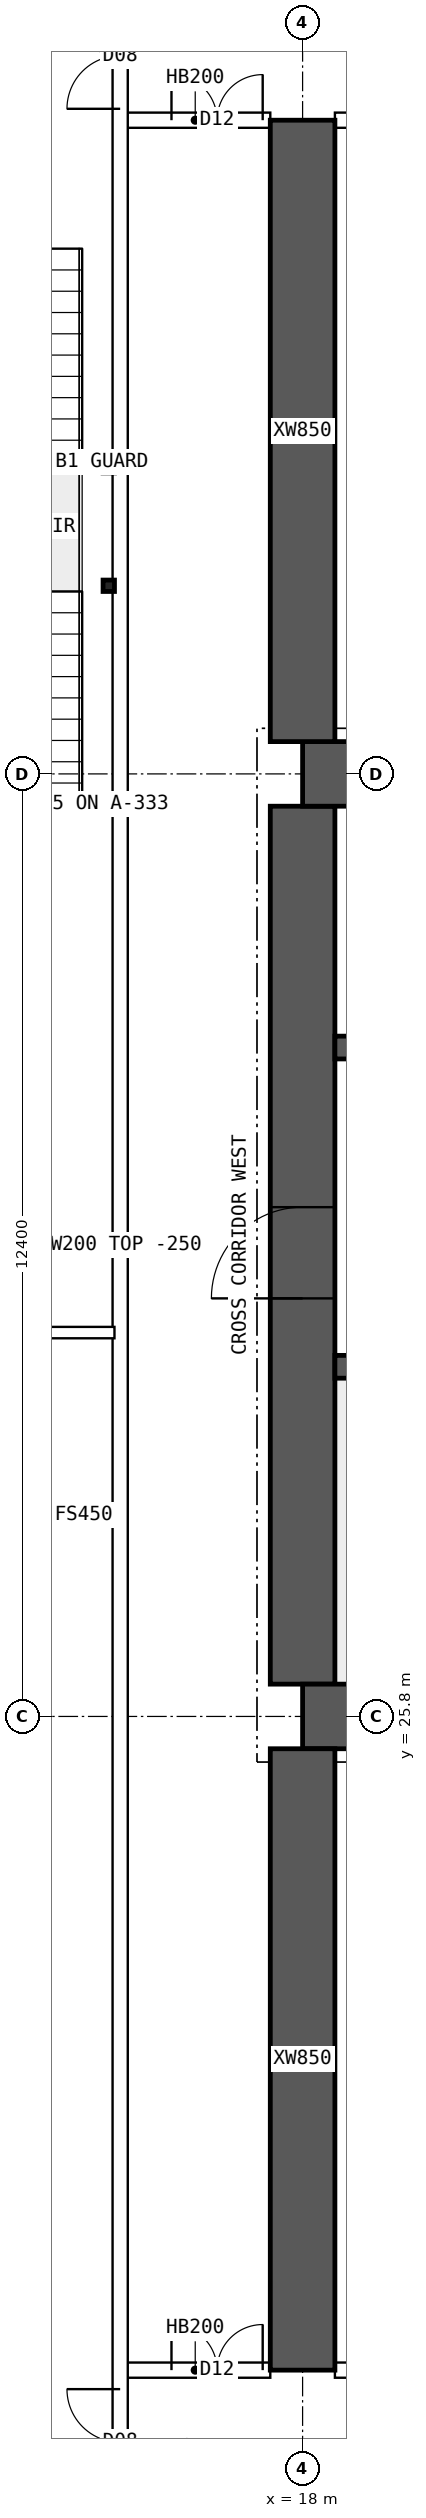
"""IFC4 building model, lengths in metres.
Left out: names, types, materials, properties, quantities, classifications, styles, units other than length and angle.
Written with IfcOpenShell. Run it as: python <this file> out.ifc"""

import sys

from ifc_helpers import new_model, si_unit, direction, frame, frame_2d, origin, origin_2d, place, context, subcontext, project, spatial, polyline, rectangle, hollow_rectangle, outline, extrude, element, fill, save


model = new_model("IFC4")
c1 = context("Model", 3, precision=1e-05, world=origin(), true_north=direction((0.0, 1.0)))
c2 = subcontext(c1, "Body", "Model", "MODEL_VIEW")
j1 = project(units=[si_unit("LENGTHUNIT", "METRE"), si_unit("PLANEANGLEUNIT", "RADIAN")], contexts=[c1])
p1 = place(None, origin())
s1 = spatial("IfcSite", under=j1, at=p1, CompositionType="ELEMENT")
p2 = place(p1, origin())
s2 = spatial("IfcBuilding", under=s1, at=p2, CompositionType="ELEMENT")
p3 = place(p2, frame((0.0, 0.0, 148.6)))
s3 = spatial("IfcBuildingStorey", under=s2, at=p3, CompositionType="ELEMENT", Elevation=148.6)
for number, where, z_axis, x_axis in (
    (1, (18.0, 25.8, 0.0), (0.0, 0.0, 1.0), (1.0, 0.0, 0.0)),
    (2, (18.0, 38.2, 0.0), (0.0, 0.0, 1.0), (1.0, 0.0, 0.0)),
):
    element("IfcWall", number, at=place(p3, frame(where, z_axis=z_axis, x_axis=x_axis)), inside=s3, PredefinedType="SHEAR", context=c2, shape_type="SweptSolid", body=[
        extrude(rectangle(XDim=48.0, YDim=0.85, at=frame_2d((24.0, 0.0))), origin(), (0.0, 0.0, 1.0), 3.75),
    ])
p4 = place(p3, frame((18.0, 26.225, 0.0), z_axis=(0.0, 0.0, 1.0), x_axis=(0.0, 1.0, 0.0)))
e3 = element("IfcWall", 3, at=p4, inside=s3, PredefinedType="SHEAR", context=c2, shape_type="SweptSolid", body=[
    extrude(rectangle(XDim=11.55, YDim=0.85, at=frame_2d((5.775, 0.0))), origin(), (0.0, 0.0, 1.0), 3.75),
])
p5 = place(p4, frame((5.075, 0.0, 0.0)))
e4 = element("IfcOpeningElement", 4, at=p5, cuts=e3, PredefinedType="OPENING", context=c2, shape_type="SweptSolid", body=[
    extrude(rectangle(XDim=1.2, YDim=2.1, at=frame_2d((0.6, 1.05))), frame((0.0, 0.435, 0.0), z_axis=(0.0, -1.0, 0.0), x_axis=(1.0, 0.0, 0.0)), (0.0, 0.0, 1.0), 0.87),
])
p6 = place(p3, frame((18.425, 30.4, 0.0), z_axis=(0.0, 0.0, 1.0), x_axis=(1.0, 0.0, 0.0)))
e5 = element("IfcWall", 5, at=p6, inside=s3, PredefinedType="SHEAR", context=c2, shape_type="SweptSolid", body=[
    extrude(rectangle(XDim=47.15, YDim=0.3, at=frame_2d((23.575, 0.0))), origin(), (0.0, 0.0, 1.0), 3.75),
])
p7 = place(p6, frame((0.4, 0.0, 0.0)))
e6 = element("IfcOpeningElement", 6, at=p7, cuts=e5, PredefinedType="OPENING", context=c2, shape_type="SweptSolid", body=[
    extrude(rectangle(XDim=1.0, YDim=2.1, at=frame_2d((0.5, 1.05))), frame((0.0, 0.16, 0.0), z_axis=(0.0, -1.0, 0.0), x_axis=(1.0, 0.0, 0.0)), (0.0, 0.0, 1.0), 0.32),
])
p8 = place(p6, frame((45.75, 0.0, 0.0)))
e7 = element("IfcOpeningElement", 7, at=p8, cuts=e5, PredefinedType="OPENING", context=c2, shape_type="SweptSolid", body=[
    extrude(rectangle(XDim=1.0, YDim=2.1, at=frame_2d((0.5, 1.05))), frame((0.0, 0.16, 0.0), z_axis=(0.0, -1.0, 0.0), x_axis=(1.0, 0.0, 0.0)), (0.0, 0.0, 1.0), 0.32),
])
p9 = place(p6, frame((8.325, 0.0, 0.0)))
e8 = element("IfcOpeningElement", 8, at=p9, cuts=e5, PredefinedType="OPENING", context=c2, shape_type="SweptSolid", body=[
    extrude(rectangle(XDim=1.1, YDim=2.1, at=frame_2d((0.55, 1.05))), frame((0.0, 0.16, 0.0), z_axis=(0.0, -1.0, 0.0), x_axis=(1.0, 0.0, 0.0)), (0.0, 0.0, 1.0), 0.32),
])
p10 = place(p6, frame((10.925, 0.0, 0.0)))
e9 = element("IfcOpeningElement", 9, at=p10, cuts=e5, PredefinedType="OPENING", context=c2, shape_type="SweptSolid", body=[
    extrude(rectangle(XDim=1.1, YDim=2.1, at=frame_2d((0.55, 1.05))), frame((0.0, 0.16, 0.0), z_axis=(0.0, -1.0, 0.0), x_axis=(1.0, 0.0, 0.0)), (0.0, 0.0, 1.0), 0.32),
])
p11 = place(p6, frame((13.525, 0.0, 0.0)))
e10 = element("IfcOpeningElement", 10, at=p11, cuts=e5, PredefinedType="OPENING", context=c2, shape_type="SweptSolid", body=[
    extrude(rectangle(XDim=1.1, YDim=2.1, at=frame_2d((0.55, 1.05))), frame((0.0, 0.16, 0.0), z_axis=(0.0, -1.0, 0.0), x_axis=(1.0, 0.0, 0.0)), (0.0, 0.0, 1.0), 0.32),
])
p12 = place(p6, frame((16.125, 0.0, 0.0)))
e11 = element("IfcOpeningElement", 11, at=p12, cuts=e5, PredefinedType="OPENING", context=c2, shape_type="SweptSolid", body=[
    extrude(rectangle(XDim=1.1, YDim=2.1, at=frame_2d((0.55, 1.05))), frame((0.0, 0.16, 0.0), z_axis=(0.0, -1.0, 0.0), x_axis=(1.0, 0.0, 0.0)), (0.0, 0.0, 1.0), 0.32),
])
p13 = place(p6, frame((18.9, 0.0, 0.0)))
e12 = element("IfcOpeningElement", 12, at=p13, cuts=e5, PredefinedType="OPENING", context=c2, shape_type="SweptSolid", body=[
    extrude(rectangle(XDim=0.9, YDim=2.1, at=frame_2d((0.45, 1.05))), frame((0.0, 0.16, 0.0), z_axis=(0.0, -1.0, 0.0), x_axis=(1.0, 0.0, 0.0)), (0.0, 0.0, 1.0), 0.32),
])
p14 = place(p6, frame((30.192, 0.0, 0.0)))
e13 = element("IfcOpeningElement", 13, at=p14, cuts=e5, PredefinedType="OPENING", context=c2, shape_type="SweptSolid", body=[
    extrude(rectangle(XDim=1.1, YDim=2.1, at=frame_2d((0.55, 1.05))), frame((0.0, 0.16, 0.0), z_axis=(0.0, -1.0, 0.0), x_axis=(1.0, 0.0, 0.0)), (0.0, 0.0, 1.0), 0.32),
])
p15 = place(p6, frame((33.725, 0.0, 0.0)))
e14 = element("IfcOpeningElement", 14, at=p15, cuts=e5, PredefinedType="OPENING", context=c2, shape_type="SweptSolid", body=[
    extrude(rectangle(XDim=1.1, YDim=2.1, at=frame_2d((0.55, 1.05))), frame((0.0, 0.16, 0.0), z_axis=(0.0, -1.0, 0.0), x_axis=(1.0, 0.0, 0.0)), (0.0, 0.0, 1.0), 0.32),
])
p16 = place(p6, frame((37.258, 0.0, 0.0)))
e15 = element("IfcOpeningElement", 15, at=p16, cuts=e5, PredefinedType="OPENING", context=c2, shape_type="SweptSolid", body=[
    extrude(rectangle(XDim=1.1, YDim=2.1, at=frame_2d((0.55, 1.05))), frame((0.0, 0.16, 0.0), z_axis=(0.0, -1.0, 0.0), x_axis=(1.0, 0.0, 0.0)), (0.0, 0.0, 1.0), 0.32),
])
p17 = place(p3, frame((18.425, 34.6, 0.0), z_axis=(0.0, 0.0, 1.0), x_axis=(1.0, 0.0, 0.0)))
e16 = element("IfcWall", 16, at=p17, inside=s3, PredefinedType="SHEAR", context=c2, shape_type="SweptSolid", body=[
    extrude(rectangle(XDim=47.15, YDim=0.3, at=frame_2d((23.575, 0.0))), origin(), (0.0, 0.0, 1.0), 3.75),
])
p18 = place(p17, frame((0.9, 0.0, 0.0)))
e17 = element("IfcOpeningElement", 17, at=p18, cuts=e16, PredefinedType="OPENING", context=c2, shape_type="SweptSolid", body=[
    extrude(rectangle(XDim=1.1, YDim=2.1, at=frame_2d((0.55, 1.05))), frame((0.0, 0.16, 0.0), z_axis=(0.0, -1.0, 0.0), x_axis=(1.0, 0.0, 0.0)), (0.0, 0.0, 1.0), 0.32),
])
p19 = place(p17, frame((45.15, 0.0, 0.0)))
e18 = element("IfcOpeningElement", 18, at=p19, cuts=e16, PredefinedType="OPENING", context=c2, shape_type="SweptSolid", body=[
    extrude(rectangle(XDim=1.1, YDim=2.1, at=frame_2d((0.55, 1.05))), frame((0.0, 0.16, 0.0), z_axis=(0.0, -1.0, 0.0), x_axis=(1.0, 0.0, 0.0)), (0.0, 0.0, 1.0), 0.32),
])
p20 = place(p17, frame((4.175, 0.0, 0.0)))
e19 = element("IfcOpeningElement", 19, at=p20, cuts=e16, PredefinedType="OPENING", context=c2, shape_type="SweptSolid", body=[
    extrude(rectangle(XDim=0.9, YDim=2.1, at=frame_2d((0.45, 1.05))), frame((0.0, 0.16, 0.0), z_axis=(0.0, -1.0, 0.0), x_axis=(1.0, 0.0, 0.0)), (0.0, 0.0, 1.0), 0.32),
])
p21 = place(p17, frame((42.075, 0.0, 0.0)))
e20 = element("IfcOpeningElement", 20, at=p21, cuts=e16, PredefinedType="OPENING", context=c2, shape_type="SweptSolid", body=[
    extrude(rectangle(XDim=0.9, YDim=2.1, at=frame_2d((0.45, 1.05))), frame((0.0, 0.16, 0.0), z_axis=(0.0, -1.0, 0.0), x_axis=(1.0, 0.0, 0.0)), (0.0, 0.0, 1.0), 0.32),
])
p22 = place(p17, frame((8.95, 0.0, 0.0)))
e21 = element("IfcOpeningElement", 21, at=p22, cuts=e16, PredefinedType="OPENING", context=c2, shape_type="SweptSolid", body=[
    extrude(rectangle(XDim=0.9, YDim=2.1, at=frame_2d((0.45, 1.05))), frame((0.0, 0.16, 0.0), z_axis=(0.0, -1.0, 0.0), x_axis=(1.0, 0.0, 0.0)), (0.0, 0.0, 1.0), 0.32),
])
p23 = place(p17, frame((12.924, 0.0, 0.0)))
e22 = element("IfcOpeningElement", 22, at=p23, cuts=e16, PredefinedType="OPENING", context=c2, shape_type="SweptSolid", body=[
    extrude(rectangle(XDim=0.9, YDim=2.1, at=frame_2d((0.45, 1.05))), frame((0.0, 0.16, 0.0), z_axis=(0.0, -1.0, 0.0), x_axis=(1.0, 0.0, 0.0)), (0.0, 0.0, 1.0), 0.32),
])
p24 = place(p17, frame((16.571, 0.0, 0.0)))
e23 = element("IfcOpeningElement", 23, at=p24, cuts=e16, PredefinedType="OPENING", context=c2, shape_type="SweptSolid", body=[
    extrude(rectangle(XDim=0.9, YDim=2.1, at=frame_2d((0.45, 1.05))), frame((0.0, 0.16, 0.0), z_axis=(0.0, -1.0, 0.0), x_axis=(1.0, 0.0, 0.0)), (0.0, 0.0, 1.0), 0.32),
])
p25 = place(p17, frame((20.33, 0.0, 0.0)))
e24 = element("IfcOpeningElement", 24, at=p25, cuts=e16, PredefinedType="OPENING", context=c2, shape_type="SweptSolid", body=[
    extrude(rectangle(XDim=0.9, YDim=2.1, at=frame_2d((0.45, 1.05))), frame((0.0, 0.16, 0.0), z_axis=(0.0, -1.0, 0.0), x_axis=(1.0, 0.0, 0.0)), (0.0, 0.0, 1.0), 0.32),
])
p26 = place(p17, frame((24.736, 0.0, 0.0)))
e25 = element("IfcOpeningElement", 25, at=p26, cuts=e16, PredefinedType="OPENING", context=c2, shape_type="SweptSolid", body=[
    extrude(rectangle(XDim=0.9, YDim=2.1, at=frame_2d((0.45, 1.05))), frame((0.0, 0.16, 0.0), z_axis=(0.0, -1.0, 0.0), x_axis=(1.0, 0.0, 0.0)), (0.0, 0.0, 1.0), 0.32),
])
p27 = place(p17, frame((27.533, 0.0, 0.0)))
e26 = element("IfcOpeningElement", 26, at=p27, cuts=e16, PredefinedType="OPENING", context=c2, shape_type="SweptSolid", body=[
    extrude(rectangle(XDim=0.9, YDim=2.1, at=frame_2d((0.45, 1.05))), frame((0.0, 0.16, 0.0), z_axis=(0.0, -1.0, 0.0), x_axis=(1.0, 0.0, 0.0)), (0.0, 0.0, 1.0), 0.32),
])
p28 = place(p17, frame((29.703, 0.0, 0.0)))
e27 = element("IfcOpeningElement", 27, at=p28, cuts=e16, PredefinedType="OPENING", context=c2, shape_type="SweptSolid", body=[
    extrude(rectangle(XDim=0.9, YDim=2.1, at=frame_2d((0.45, 1.05))), frame((0.0, 0.16, 0.0), z_axis=(0.0, -1.0, 0.0), x_axis=(1.0, 0.0, 0.0)), (0.0, 0.0, 1.0), 0.32),
])
p29 = place(p17, frame((33.502, 0.0, 0.0)))
e28 = element("IfcOpeningElement", 28, at=p29, cuts=e16, PredefinedType="OPENING", context=c2, shape_type="SweptSolid", body=[
    extrude(rectangle(XDim=0.9, YDim=2.1, at=frame_2d((0.45, 1.05))), frame((0.0, 0.16, 0.0), z_axis=(0.0, -1.0, 0.0), x_axis=(1.0, 0.0, 0.0)), (0.0, 0.0, 1.0), 0.32),
])
p30 = place(p17, frame((37.453, 0.0, 0.0)))
e29 = element("IfcOpeningElement", 29, at=p30, cuts=e16, PredefinedType="OPENING", context=c2, shape_type="SweptSolid", body=[
    extrude(rectangle(XDim=0.9, YDim=2.1, at=frame_2d((0.45, 1.05))), frame((0.0, 0.16, 0.0), z_axis=(0.0, -1.0, 0.0), x_axis=(1.0, 0.0, 0.0)), (0.0, 0.0, 1.0), 0.32),
])
for number, where, z_axis, x_axis in (
    (30, (18.0, 17.2, 0.0), (0.0, 0.0, 1.0), (0.0, 1.0, 0.0)),
    (31, (18.0, 38.625, 0.0), (0.0, 0.0, 1.0), (0.0, 1.0, 0.0)),
):
    element("IfcWall", number, at=place(p3, frame(where, z_axis=z_axis, x_axis=x_axis)), inside=s3, PredefinedType="SHEAR", context=c2, shape_type="SweptSolid", body=[
        extrude(rectangle(XDim=8.175, YDim=0.85, at=frame_2d((4.087, 0.0))), origin(), (0.0, 0.0, 1.0), 3.75),
    ])
p31 = place(p3, frame((15.6, 17.2, 0.0), z_axis=(0.0, 0.0, 1.0), x_axis=(1.0, 0.0, 0.0)))
e32 = element("IfcWall", 32, at=p31, inside=s3, PredefinedType="SOLIDWALL", context=c2, shape_type="SweptSolid", body=[
    extrude(rectangle(XDim=1.975, YDim=0.2, at=frame_2d((0.987, 0.0))), origin(), (0.0, 0.0, 1.0), 3.5),
])
p32 = place(p31, frame((0.675, 0.0, 0.0)))
e33 = element("IfcOpeningElement", 33, at=p32, cuts=e32, PredefinedType="OPENING", context=c2, shape_type="SweptSolid", body=[
    extrude(rectangle(XDim=1.2, YDim=2.1, at=frame_2d((0.6, 1.05))), frame((0.0, 0.11, 0.0), z_axis=(0.0, -1.0, 0.0), x_axis=(1.0, 0.0, 0.0)), (0.0, 0.0, 1.0), 0.22),
])
p33 = place(p3, frame((18.425, 17.2, 0.0), z_axis=(0.0, 0.0, 1.0), x_axis=(1.0, 0.0, 0.0)))
e34 = element("IfcWall", 34, at=p33, inside=s3, PredefinedType="SOLIDWALL", context=c2, shape_type="SweptSolid", body=[
    extrude(rectangle(XDim=5.15, YDim=0.2, at=frame_2d((2.575, 0.0))), origin(), (0.0, 0.0, 1.0), 3.5),
])
p34 = place(p33, frame((0.8, 0.0, 0.0)))
e35 = element("IfcOpeningElement", 35, at=p34, cuts=e34, PredefinedType="OPENING", context=c2, shape_type="SweptSolid", body=[
    extrude(rectangle(XDim=1.0, YDim=2.1, at=frame_2d((0.5, 1.05))), frame((0.0, 0.11, 0.0), z_axis=(0.0, -1.0, 0.0), x_axis=(1.0, 0.0, 0.0)), (0.0, 0.0, 1.0), 0.22),
])
p35 = place(p3, frame((15.6, 46.8, 0.0), z_axis=(0.0, 0.0, 1.0), x_axis=(1.0, 0.0, 0.0)))
e36 = element("IfcWall", 36, at=p35, inside=s3, PredefinedType="SOLIDWALL", context=c2, shape_type="SweptSolid", body=[
    extrude(rectangle(XDim=1.975, YDim=0.2, at=frame_2d((0.987, 0.0))), origin(), (0.0, 0.0, 1.0), 3.5),
])
p36 = place(p35, frame((0.675, 0.0, 0.0)))
e37 = element("IfcOpeningElement", 37, at=p36, cuts=e36, PredefinedType="OPENING", context=c2, shape_type="SweptSolid", body=[
    extrude(rectangle(XDim=1.2, YDim=2.1, at=frame_2d((0.6, 1.05))), frame((0.0, 0.11, 0.0), z_axis=(0.0, -1.0, 0.0), x_axis=(1.0, 0.0, 0.0)), (0.0, 0.0, 1.0), 0.22),
])
p37 = place(p3, frame((18.425, 46.8, 0.0), z_axis=(0.0, 0.0, 1.0), x_axis=(1.0, 0.0, 0.0)))
e38 = element("IfcWall", 38, at=p37, inside=s3, PredefinedType="SOLIDWALL", context=c2, shape_type="SweptSolid", body=[
    extrude(rectangle(XDim=5.15, YDim=0.2, at=frame_2d((2.575, 0.0))), origin(), (0.0, 0.0, 1.0), 3.5),
])
p38 = place(p37, frame((0.8, 0.0, 0.0)))
e39 = element("IfcOpeningElement", 39, at=p38, cuts=e38, PredefinedType="OPENING", context=c2, shape_type="SweptSolid", body=[
    extrude(rectangle(XDim=1.0, YDim=2.1, at=frame_2d((0.5, 1.05))), frame((0.0, 0.11, 0.0), z_axis=(0.0, -1.0, 0.0), x_axis=(1.0, 0.0, 0.0)), (0.0, 0.0, 1.0), 0.22),
])
p39 = place(p3, frame((8.705, 30.85, 0.0), z_axis=(0.0, 0.0, 1.0), x_axis=(1.0, 0.0, 0.0)))
e40 = element("IfcWall", 40, at=p39, inside=s3, PredefinedType="PARTITIONING", context=c2, shape_type="SweptSolid", body=[
    extrude(outline(polyline([(0.0, 0.0), (6.82, 0.0), (6.82, 3.5), (3.597, 3.5), (3.595, 3.05), (2.997, 3.05), (2.995, 3.5), (0.0, 3.5), (0.0, 0.0)])), frame((0.0, 0.075, 0.0), z_axis=(0.0, -1.0, 0.0), x_axis=(1.0, 0.0, 0.0)), (0.0, 0.0, 1.0), 0.15),
])
p40 = place(p3, frame((15.6, 10.446, 0.0), z_axis=(0.0, 0.0, 1.0), x_axis=(0.0, 1.0, 0.0)))
e41 = element("IfcWall", 41, at=p40, inside=s3, PredefinedType="SOLIDWALL", context=c2, shape_type="SweptSolid", body=[
    extrude(rectangle(XDim=43.107, YDim=0.2, at=frame_2d((21.554, 0.0))), origin(), (0.0, 0.0, 1.0), 3.5),
])
p41 = place(p40, frame((5.104, 0.0, 0.0)))
e42 = element("IfcOpeningElement", 42, at=p41, cuts=e41, PredefinedType="OPENING", context=c2, shape_type="SweptSolid", body=[
    extrude(rectangle(XDim=1.4, YDim=2.1, at=frame_2d((0.7, 1.05))), frame((0.0, 0.11, 0.0), z_axis=(0.0, -1.0, 0.0), x_axis=(1.0, 0.0, 0.0)), (0.0, 0.0, 1.0), 0.22),
])
p42 = place(p40, frame((36.504, 0.0, 0.0)))
e43 = element("IfcOpeningElement", 43, at=p42, cuts=e41, PredefinedType="OPENING", context=c2, shape_type="SweptSolid", body=[
    extrude(rectangle(XDim=1.4, YDim=2.1, at=frame_2d((0.7, 1.05))), frame((0.0, 0.11, 0.0), z_axis=(0.0, -1.0, 0.0), x_axis=(1.0, 0.0, 0.0)), (0.0, 0.0, 1.0), 0.22),
])
for number, where, z_axis, x_axis in (
    (44, (15.45, 40.675, 0.0), (0.0, 0.0, 1.0), (1.0, 0.0, 0.0)),
    (45, (15.45, 42.235, 0.0), (0.0, 0.0, 1.0), (1.0, 0.0, 0.0)),
):
    element("IfcColumn", number, at=place(p3, frame(where, z_axis=z_axis, x_axis=x_axis)), inside=s3, PredefinedType="COLUMN", context=c2, shape_type="SweptSolid", body=[
        extrude(hollow_rectangle(XDim=0.15, YDim=0.15, WallThickness=0.008, at=origin_2d()), origin(), (0.0, 0.0, 1.0), 3.5),
    ])
p43 = place(p5, origin())
e46 = element("IfcDoor", 46, at=p43, inside=s3, OperationType="SINGLE_SWING_LEFT", PredefinedType="DOOR", context=c2, shape_type="SweptSolid", body=[
    extrude(rectangle(XDim=1.2, YDim=2.1, at=frame_2d((0.6, 1.05))), frame((0.0, 0.025, 0.0), z_axis=(0.0, -1.0, 0.0), x_axis=(1.0, 0.0, 0.0)), (0.0, 0.0, 1.0), 0.05),
])
fill(e4, e46)
p44 = place(p32, origin())
e47 = element("IfcDoor", 47, at=p44, inside=s3, OperationType="DOUBLE_DOOR_SINGLE_SWING", PredefinedType="DOOR", context=c2, shape_type="SweptSolid", body=[
    extrude(rectangle(XDim=1.2, YDim=2.1, at=frame_2d((0.6, 1.05))), frame((0.0, 0.025, 0.0), z_axis=(0.0, -1.0, 0.0), x_axis=(1.0, 0.0, 0.0)), (0.0, 0.0, 1.0), 0.05),
])
fill(e33, e47)
p45 = place(p36, origin())
e48 = element("IfcDoor", 48, at=p45, inside=s3, OperationType="DOUBLE_DOOR_SINGLE_SWING", PredefinedType="DOOR", context=c2, shape_type="SweptSolid", body=[
    extrude(rectangle(XDim=1.2, YDim=2.1, at=frame_2d((0.6, 1.05))), frame((0.0, 0.025, 0.0), z_axis=(0.0, -1.0, 0.0), x_axis=(1.0, 0.0, 0.0)), (0.0, 0.0, 1.0), 0.05),
])
fill(e37, e48)
p46 = place(p41, origin())
e49 = element("IfcDoor", 49, at=p46, inside=s3, OperationType="DOUBLE_DOOR_SINGLE_SWING", PredefinedType="DOOR", context=c2, shape_type="SweptSolid", body=[
    extrude(rectangle(XDim=1.4, YDim=2.1, at=frame_2d((0.7, 1.05))), frame((0.0, 0.025, 0.0), z_axis=(0.0, -1.0, 0.0), x_axis=(1.0, 0.0, 0.0)), (0.0, 0.0, 1.0), 0.05),
])
fill(e42, e49)
p47 = place(p42, origin())
e50 = element("IfcDoor", 50, at=p47, inside=s3, OperationType="DOUBLE_DOOR_SINGLE_SWING", PredefinedType="DOOR", context=c2, shape_type="SweptSolid", body=[
    extrude(rectangle(XDim=1.4, YDim=2.1, at=frame_2d((0.7, 1.05))), frame((0.0, 0.025, 0.0), z_axis=(0.0, -1.0, 0.0), x_axis=(1.0, 0.0, 0.0)), (0.0, 0.0, 1.0), 0.05),
])
fill(e43, e50)
save(model, sys.argv[1])
